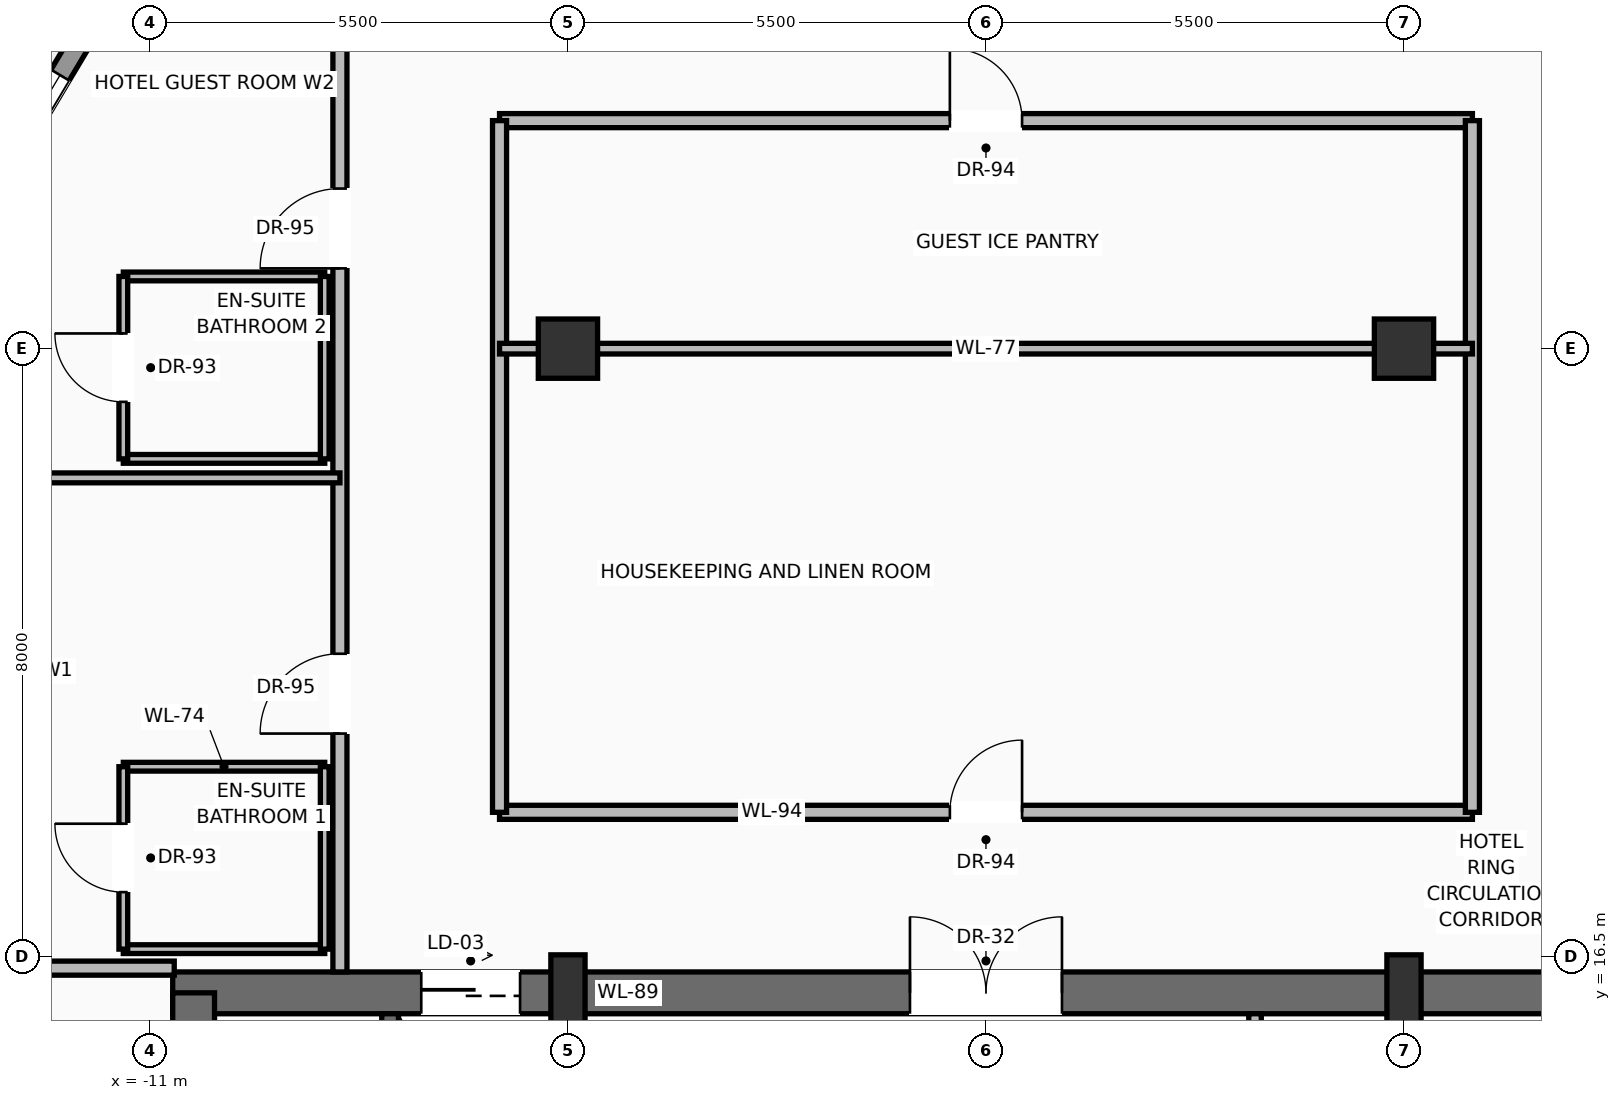
"""IFC4 building model, lengths in metres.
Left out: names, types, materials, properties, quantities, classifications, styles, units other than length and angle.
Written with IfcOpenShell. Run it as: python <this file> out.ifc"""

import sys

from ifc_helpers import new_model, si_unit, direction, frame, frame_2d, origin, origin_2d, place, context, subcontext, project, spatial, rectangle, extrude, source, transform, mapped, element, fill, save


model = new_model("IFC4")
c1 = context("Model", 3, precision=1e-05, world=origin(), true_north=direction((0.0, 1.0)))
c2 = subcontext(c1, "Body", "Model", "MODEL_VIEW")
j1 = project(units=[si_unit("LENGTHUNIT", "METRE"), si_unit("PLANEANGLEUNIT", "RADIAN")], contexts=[c1])
p1 = place(None, origin())
s1 = spatial("IfcSite", under=j1, at=p1, CompositionType="ELEMENT")
p2 = place(p1, origin())
s2 = spatial("IfcBuilding", under=s1, at=p2, CompositionType="ELEMENT")
p3 = place(p2, frame((0.0, 0.0, 223.45)))
s3 = spatial("IfcBuildingStorey", under=s2, at=p3, CompositionType="ELEMENT", Elevation=223.45)
p4 = place(p3, frame((-10.7, 16.025, 0.0), z_axis=(0.0, 0.0, 1.0), x_axis=(1.0, 0.0, 0.0)))
e1 = element("IfcWall", 1, at=p4, inside=s3, PredefinedType="SHEAR", context=c2, shape_type="SweptSolid", body=[
    extrude(rectangle(XDim=21.4, YDim=0.55, at=frame_2d((10.7, 0.0))), origin(), (0.0, 0.0, 1.0), 3.24),
])
p5 = place(p4, frame((3.27, 0.0, 0.0)))
e2 = element("IfcOpeningElement", 2, at=p5, cuts=e1, PredefinedType="OPENING", context=c2, shape_type="SweptSolid", body=[
    extrude(rectangle(XDim=1.3, YDim=2.3, at=frame_2d((0.65, 1.15))), frame((0.0, 0.285, 0.0), z_axis=(0.0, -1.0, 0.0), x_axis=(1.0, 0.0, 0.0)), (0.0, 0.0, 1.0), 0.57),
])
p6 = place(p4, frame((9.7, 0.0, 0.0)))
e3 = element("IfcOpeningElement", 3, at=p6, cuts=e1, PredefinedType="OPENING", context=c2, shape_type="SweptSolid", body=[
    extrude(rectangle(XDim=2.0, YDim=2.4, at=frame_2d((1.0, 1.2))), frame((0.0, 0.285, 0.0), z_axis=(0.0, -1.0, 0.0), x_axis=(1.0, 0.0, 0.0)), (0.0, 0.0, 1.0), 0.57),
])
p7 = place(p3, frame((-10.425, 0.575, 0.0), z_axis=(0.0, 0.0, 1.0), x_axis=(0.0, 1.0, 0.0)))
e4 = element("IfcWall", 4, at=p7, inside=s3, PredefinedType="SHEAR", context=c2, shape_type="SweptSolid", body=[
    extrude(rectangle(XDim=15.45, YDim=0.55, at=frame_2d((7.725, 0.0))), origin(), (0.0, 0.0, 1.0), 3.24),
])
p8 = place(p3, frame((-5.5, 0.575, 0.0), z_axis=(0.0, 0.0, 1.0), x_axis=(0.0, 1.0, 0.0)))
e5 = element("IfcWall", 5, at=p8, inside=s3, PredefinedType="SHEAR", context=c2, shape_type="SweptSolid", body=[
    extrude(rectangle(XDim=15.45, YDim=0.4, at=frame_2d((7.725, 0.0))), origin(), (0.0, 0.0, 1.0), 3.24),
])
p9 = place(p8, frame((8.925, 0.0, 0.0)))
e6 = element("IfcOpeningElement", 6, at=p9, cuts=e5, PredefinedType="OPENING", context=c2, shape_type="SweptSolid", body=[
    extrude(rectangle(XDim=1.1, YDim=2.2, at=frame_2d((0.55, 1.1))), frame((0.0, 0.21, 0.0), z_axis=(0.0, -1.0, 0.0), x_axis=(1.0, 0.0, 0.0)), (0.0, 0.0, 1.0), 0.42),
])
p10 = place(p3, frame((5.5, 0.575, 0.0), z_axis=(0.0, 0.0, 1.0), x_axis=(0.0, 1.0, 0.0)))
e7 = element("IfcWall", 7, at=p10, inside=s3, PredefinedType="SHEAR", context=c2, shape_type="SweptSolid", body=[
    extrude(rectangle(XDim=15.45, YDim=0.4, at=frame_2d((7.725, 0.0))), origin(), (0.0, 0.0, 1.0), 3.24),
])
p11 = place(p10, frame((8.925, 0.0, 0.0)))
e8 = element("IfcOpeningElement", 8, at=p11, cuts=e7, PredefinedType="OPENING", context=c2, shape_type="SweptSolid", body=[
    extrude(rectangle(XDim=1.1, YDim=2.2, at=frame_2d((0.55, 1.1))), frame((0.0, 0.21, 0.0), z_axis=(0.0, -1.0, 0.0), x_axis=(1.0, 0.0, 0.0)), (0.0, 0.0, 1.0), 0.42),
])
m1 = source(origin(), c2, "Body", "SweptSolid", [
    extrude(rectangle(XDim=0.45, YDim=0.95, at=origin_2d()), origin(), (0.0, 0.0, 1.0), 3.45),
])
for number, where, z_axis, x_axis in (
    (9, (-5.5, 16.05, 0.0), (0.0, 0.0, 1.0), (1.0, 0.0, 0.0)),
    (10, (5.5, 16.05, 0.0), (0.0, 0.0, 1.0), (1.0, 0.0, 0.0)),
):
    element("IfcColumn", number, at=place(p3, frame(where, z_axis=z_axis, x_axis=x_axis)), inside=s3, PredefinedType="PILASTER", context=c2, shape_type="MappedRepresentation", body=[
        mapped(m1, transform((0.0, 0.0, 0.0), scale=1.0)),
    ])
m2 = source(origin(), c2, "Body", "SweptSolid", [
    extrude(rectangle(XDim=0.78, YDim=0.78, at=origin_2d()), origin(), (0.0, 0.0, 1.0), 3.45),
])
for number, where, z_axis, x_axis in (
    (11, (-5.5, 24.5, 0.0), (0.0, 0.0, 1.0), (1.0, 0.0, 0.0)),
    (12, (5.5, 24.5, 0.0), (0.0, 0.0, 1.0), (1.0, 0.0, 0.0)),
):
    element("IfcColumn", number, at=place(p3, frame(where, z_axis=z_axis, x_axis=x_axis)), inside=s3, PredefinedType="COLUMN", context=c2, shape_type="MappedRepresentation", body=[
        mapped(m2, transform((0.0, 0.0, 0.0), scale=1.0)),
    ])
p12 = place(p3, frame((-19.736, 15.464, 0.0), z_axis=(0.0, 0.0, 1.0), x_axis=(0.513136432844, 0.858307055364, 0.0)))
e13 = element("IfcWall", 13, at=p12, inside=s3, PredefinedType="SOLIDWALL", context=c2, shape_type="SweptSolid", body=[
    extrude(rectangle(XDim=19.37, YDim=0.28, at=frame_2d((9.685, 0.0))), origin(), (0.0, 0.0, 1.0), 2.82),
])
p13 = place(p12, frame((4.649, 0.0, 0.0)))
e14 = element("IfcOpeningElement", 14, at=p13, cuts=e13, PredefinedType="OPENING", context=c2, shape_type="SweptSolid", body=[
    extrude(rectangle(XDim=1.6, YDim=2.35, at=frame_2d((0.8, 1.175))), frame((0.0, 0.15, 0.0), z_axis=(0.0, -1.0, 0.0), x_axis=(1.0, 0.0, 0.0)), (0.0, 0.0, 1.0), 0.3),
])
p14 = place(p12, frame((13.171, 0.0, 0.9)))
e15 = element("IfcOpeningElement", 15, at=p14, cuts=e13, PredefinedType="OPENING", context=c2, shape_type="SweptSolid", body=[
    extrude(rectangle(XDim=1.55, YDim=1.75, at=frame_2d((0.775, 0.875))), frame((0.0, 0.15, 0.0), z_axis=(0.0, -1.0, 0.0), x_axis=(1.0, 0.0, 0.0)), (0.0, 0.0, 1.0), 0.3),
])
p15 = place(p3, frame((-7.84, 11.87, 0.0), z_axis=(0.0, 0.0, 1.0), x_axis=(0.0, 1.0, 0.0)))
e16 = element("IfcWall", 16, at=p15, inside=s3, PredefinedType="SOLIDWALL", context=c2, shape_type="SweptSolid", body=[
    extrude(rectangle(XDim=3.88, YDim=0.22, at=frame_2d((1.94, 0.0))), origin(), (0.0, 0.0, 1.0), 3.24),
])
p16 = place(p3, frame((3.54, 11.22, 0.0), z_axis=(0.0, 0.0, 1.0), x_axis=(0.0, 1.0, 0.0)))
e17 = element("IfcWall", 17, at=p16, inside=s3, PredefinedType="PARTITIONING", context=c2, shape_type="SweptSolid", body=[
    extrude(rectangle(XDim=4.53, YDim=0.165, at=frame_2d((2.265, 0.0))), origin(), (0.0, 0.0, 1.0), 3.232),
])
p17 = place(p16, frame((1.25, 0.0, 0.0)))
e18 = element("IfcOpeningElement", 18, at=p17, cuts=e17, PredefinedType="OPENING", context=c2, shape_type="SweptSolid", body=[
    extrude(rectangle(XDim=0.9, YDim=2.1, at=frame_2d((0.45, 1.05))), frame((0.0, 0.093, 0.0), z_axis=(0.0, -1.0, 0.0), x_axis=(1.0, 0.0, 0.0)), (0.0, 0.0, 1.0), 0.185),
])
p18 = place(p3, frame((-6.4, 18.4, 0.0), z_axis=(0.0, 0.0, 1.0), x_axis=(1.0, 0.0, 0.0)))
e19 = element("IfcWall", 19, at=p18, inside=s3, PredefinedType="PARTITIONING", context=c2, shape_type="SweptSolid", body=[
    extrude(rectangle(XDim=12.8, YDim=0.185, at=frame_2d((6.4, 0.0))), origin(), (0.0, 0.0, 1.0), 3.232),
])
p19 = place(p18, frame((5.925, 0.0, 0.0)))
e20 = element("IfcOpeningElement", 20, at=p19, cuts=e19, PredefinedType="OPENING", context=c2, shape_type="SweptSolid", body=[
    extrude(rectangle(XDim=0.95, YDim=2.2, at=frame_2d((0.475, 1.1))), frame((0.0, 0.103, 0.0), z_axis=(0.0, -1.0, 0.0), x_axis=(1.0, 0.0, 0.0)), (0.0, 0.0, 1.0), 0.205),
])
p20 = place(p3, frame((-6.4, 27.5, 0.0), z_axis=(0.0, 0.0, 1.0), x_axis=(1.0, 0.0, 0.0)))
e21 = element("IfcWall", 21, at=p20, inside=s3, PredefinedType="PARTITIONING", context=c2, shape_type="SweptSolid", body=[
    extrude(rectangle(XDim=12.8, YDim=0.185, at=frame_2d((6.4, 0.0))), origin(), (0.0, 0.0, 1.0), 3.232),
])
p21 = place(p20, frame((5.925, 0.0, 0.0)))
e22 = element("IfcOpeningElement", 22, at=p21, cuts=e21, PredefinedType="OPENING", context=c2, shape_type="SweptSolid", body=[
    extrude(rectangle(XDim=0.95, YDim=2.2, at=frame_2d((0.475, 1.1))), frame((0.0, 0.103, 0.0), z_axis=(0.0, -1.0, 0.0), x_axis=(1.0, 0.0, 0.0)), (0.0, 0.0, 1.0), 0.205),
])
for number, where, z_axis, x_axis in (
    (23, (-6.4, 18.4, 0.0), (0.0, 0.0, 1.0), (0.0, 1.0, 0.0)),
    (24, (6.4, 18.4, 0.0), (0.0, 0.0, 1.0), (0.0, 1.0, 0.0)),
):
    element("IfcWall", number, at=place(p3, frame(where, z_axis=z_axis, x_axis=x_axis)), inside=s3, PredefinedType="PARTITIONING", context=c2, shape_type="SweptSolid", body=[
        extrude(rectangle(XDim=9.1, YDim=0.185, at=frame_2d((4.55, 0.0))), origin(), (0.0, 0.0, 1.0), 3.232),
    ])
p22 = place(p3, frame((-8.5, 16.3, 0.0), z_axis=(0.0, 0.0, 1.0), x_axis=(0.0, 1.0, 0.0)))
e25 = element("IfcWall", 25, at=p22, inside=s3, PredefinedType="PARTITIONING", context=c2, shape_type="SweptSolid", body=[
    extrude(rectangle(XDim=13.3, YDim=0.185, at=frame_2d((6.65, 0.0))), origin(), (0.0, 0.0, 1.0), 3.232),
])
p23 = place(p22, frame((3.136, 0.0, 0.0)))
e26 = element("IfcOpeningElement", 26, at=p23, cuts=e25, PredefinedType="OPENING", context=c2, shape_type="SweptSolid", body=[
    extrude(rectangle(XDim=1.05, YDim=2.25, at=frame_2d((0.525, 1.125))), frame((0.0, 0.103, 0.0), z_axis=(0.0, -1.0, 0.0), x_axis=(1.0, 0.0, 0.0)), (0.0, 0.0, 1.0), 0.205),
])
p24 = place(p22, frame((9.256, 0.0, 0.0)))
e27 = element("IfcOpeningElement", 27, at=p24, cuts=e25, PredefinedType="OPENING", context=c2, shape_type="SweptSolid", body=[
    extrude(rectangle(XDim=1.05, YDim=2.25, at=frame_2d((0.525, 1.125))), frame((0.0, 0.103, 0.0), z_axis=(0.0, -1.0, 0.0), x_axis=(1.0, 0.0, 0.0)), (0.0, 0.0, 1.0), 0.205),
])
p25 = place(p3, frame((-6.4, 24.5, 0.0), z_axis=(0.0, 0.0, 1.0), x_axis=(1.0, 0.0, 0.0)))
e28 = element("IfcWall", 28, at=p25, inside=s3, PredefinedType="PARTITIONING", context=c2, shape_type="SweptSolid", body=[
    extrude(rectangle(XDim=12.8, YDim=0.14, at=frame_2d((6.4, 0.0))), origin(), (0.0, 0.0, 1.0), 2.683),
])
p26 = place(p3, frame((-19.358, 16.35, 0.0), z_axis=(0.0, 0.0, 1.0), x_axis=(1.0, 0.0, 0.0)))
e29 = element("IfcWall", 29, at=p26, inside=s3, PredefinedType="PARTITIONING", context=c2, shape_type="SweptSolid", body=[
    extrude(rectangle(XDim=8.678, YDim=0.185, at=frame_2d((4.339, 0.0))), origin(), (0.0, 0.0, 1.0), 3.232),
])
p27 = place(p26, frame((5.013, 0.0, 0.0)))
e30 = element("IfcOpeningElement", 30, at=p27, cuts=e29, PredefinedType="OPENING", context=c2, shape_type="SweptSolid", body=[
    extrude(rectangle(XDim=1.05, YDim=2.25, at=frame_2d((0.525, 1.125))), frame((0.0, 0.103, 0.0), z_axis=(0.0, -1.0, 0.0), x_axis=(1.0, 0.0, 0.0)), (0.0, 0.0, 1.0), 0.205),
])
for number, where, z_axis, x_axis in (
    (31, (-11.35, 16.6, 0.0), (0.0, 0.0, 1.0), (1.0, 0.0, 0.0)),
    (32, (-11.35, 19.0, 0.0), (0.0, 0.0, 1.0), (1.0, 0.0, 0.0)),
):
    element("IfcWall", number, at=place(p3, frame(where, z_axis=z_axis, x_axis=x_axis)), inside=s3, PredefinedType="PARTITIONING", context=c2, shape_type="SweptSolid", body=[
        extrude(rectangle(XDim=2.65, YDim=0.115, at=frame_2d((1.325, 0.0))), origin(), (0.0, 0.0, 1.0), 3.232),
    ])
p28 = place(p3, frame((-11.35, 16.6, 0.0), z_axis=(0.0, 0.0, 1.0), x_axis=(0.0, 1.0, 0.0)))
e33 = element("IfcWall", 33, at=p28, inside=s3, PredefinedType="PARTITIONING", context=c2, shape_type="SweptSolid", body=[
    extrude(rectangle(XDim=2.4, YDim=0.115, at=frame_2d((1.2, 0.0))), origin(), (0.0, 0.0, 1.0), 3.232),
])
p29 = place(p28, frame((0.75, 0.0, 0.0)))
e34 = element("IfcOpeningElement", 34, at=p29, cuts=e33, PredefinedType="OPENING", context=c2, shape_type="SweptSolid", body=[
    extrude(rectangle(XDim=0.9, YDim=2.15, at=frame_2d((0.45, 1.075))), frame((0.0, 0.067, 0.0), z_axis=(0.0, -1.0, 0.0), x_axis=(1.0, 0.0, 0.0)), (0.0, 0.0, 1.0), 0.135),
])
p30 = place(p3, frame((-8.7, 16.6, 0.0), z_axis=(0.0, 0.0, 1.0), x_axis=(0.0, 1.0, 0.0)))
e35 = element("IfcWall", 35, at=p30, inside=s3, PredefinedType="PARTITIONING", context=c2, shape_type="SweptSolid", body=[
    extrude(rectangle(XDim=2.4, YDim=0.115, at=frame_2d((1.2, 0.0))), origin(), (0.0, 0.0, 1.0), 3.232),
])
p31 = place(p3, frame((-15.501, 22.8, 0.0), z_axis=(0.0, 0.0, 1.0), x_axis=(1.0, 0.0, 0.0)))
e36 = element("IfcWall", 36, at=p31, inside=s3, PredefinedType="PARTITIONING", context=c2, shape_type="SweptSolid", body=[
    extrude(rectangle(XDim=7.001, YDim=0.13, at=frame_2d((3.501, 0.0))), origin(), (0.0, 0.0, 1.0), 3.232),
])
for number, where, z_axis, x_axis in (
    (37, (-11.35, 23.05, 0.0), (0.0, 0.0, 1.0), (1.0, 0.0, 0.0)),
    (38, (-11.35, 25.45, 0.0), (0.0, 0.0, 1.0), (1.0, 0.0, 0.0)),
):
    element("IfcWall", number, at=place(p3, frame(where, z_axis=z_axis, x_axis=x_axis)), inside=s3, PredefinedType="PARTITIONING", context=c2, shape_type="SweptSolid", body=[
        extrude(rectangle(XDim=2.65, YDim=0.115, at=frame_2d((1.325, 0.0))), origin(), (0.0, 0.0, 1.0), 3.232),
    ])
p32 = place(p3, frame((-11.35, 23.05, 0.0), z_axis=(0.0, 0.0, 1.0), x_axis=(0.0, 1.0, 0.0)))
e39 = element("IfcWall", 39, at=p32, inside=s3, PredefinedType="PARTITIONING", context=c2, shape_type="SweptSolid", body=[
    extrude(rectangle(XDim=2.4, YDim=0.115, at=frame_2d((1.2, 0.0))), origin(), (0.0, 0.0, 1.0), 3.232),
])
p33 = place(p32, frame((0.75, 0.0, 0.0)))
e40 = element("IfcOpeningElement", 40, at=p33, cuts=e39, PredefinedType="OPENING", context=c2, shape_type="SweptSolid", body=[
    extrude(rectangle(XDim=0.9, YDim=2.15, at=frame_2d((0.45, 1.075))), frame((0.0, 0.067, 0.0), z_axis=(0.0, -1.0, 0.0), x_axis=(1.0, 0.0, 0.0)), (0.0, 0.0, 1.0), 0.135),
])
p34 = place(p3, frame((-8.7, 23.05, 0.0), z_axis=(0.0, 0.0, 1.0), x_axis=(0.0, 1.0, 0.0)))
e41 = element("IfcWall", 41, at=p34, inside=s3, PredefinedType="PARTITIONING", context=c2, shape_type="SweptSolid", body=[
    extrude(rectangle(XDim=2.4, YDim=0.115, at=frame_2d((1.2, 0.0))), origin(), (0.0, 0.0, 1.0), 3.232),
])
m3 = source(origin(), c2, "Body", "SweptSolid", [
    extrude(rectangle(XDim=1.55, YDim=1.75, at=frame_2d((0.775, 0.875))), frame((0.0, 0.03, 0.0), z_axis=(0.0, -1.0, 0.0), x_axis=(1.0, 0.0, 0.0)), (0.0, 0.0, 1.0), 0.06),
])
p35 = place(p14, origin())
e42 = element("IfcWindow", 42, at=p35, inside=s3, PartitioningType="SINGLE_PANEL", PredefinedType="WINDOW", context=c2, shape_type="MappedRepresentation", body=[
    mapped(m3, transform((0.0, 0.0, 0.0), scale=1.0)),
])
fill(e15, e42)
m4 = source(origin(), c2, "Body", "SweptSolid", [
    extrude(rectangle(XDim=1.3, YDim=2.3, at=frame_2d((0.65, 1.15))), frame((0.0, 0.025, 0.0), z_axis=(0.0, -1.0, 0.0), x_axis=(1.0, 0.0, 0.0)), (0.0, 0.0, 1.0), 0.05),
])
p36 = place(p5, origin())
e43 = element("IfcDoor", 43, at=p36, inside=s3, OperationType="SLIDING_TO_RIGHT", PredefinedType="DOOR", context=c2, shape_type="MappedRepresentation", body=[
    mapped(m4, transform((0.0, 0.0, 0.0), scale=1.0)),
])
fill(e2, e43)
m5 = source(origin(), c2, "Body", "SweptSolid", [
    extrude(rectangle(XDim=2.0, YDim=2.4, at=frame_2d((1.0, 1.2))), frame((0.0, 0.025, 0.0), z_axis=(0.0, -1.0, 0.0), x_axis=(1.0, 0.0, 0.0)), (0.0, 0.0, 1.0), 0.05),
])
p37 = place(p6, origin())
e44 = element("IfcDoor", 44, at=p37, inside=s3, OperationType="DOUBLE_DOOR_SINGLE_SWING", PredefinedType="DOOR", context=c2, shape_type="MappedRepresentation", body=[
    mapped(m5, transform((0.0, 0.0, 0.0), scale=1.0)),
])
fill(e3, e44)
m6 = source(origin(), c2, "Body", "SweptSolid", [
    extrude(rectangle(XDim=0.95, YDim=2.2, at=frame_2d((0.475, 1.1))), frame((0.0, 0.025, 0.0), z_axis=(0.0, -1.0, 0.0), x_axis=(1.0, 0.0, 0.0)), (0.0, 0.0, 1.0), 0.05),
])
p38 = place(p19, origin())
e45 = element("IfcDoor", 45, at=p38, inside=s3, OperationType="SINGLE_SWING_RIGHT", PredefinedType="DOOR", context=c2, shape_type="MappedRepresentation", body=[
    mapped(m6, transform((0.0, 0.0, 0.0), scale=1.0)),
])
fill(e20, e45)
p39 = place(p21, origin())
e46 = element("IfcDoor", 46, at=p39, inside=s3, OperationType="SINGLE_SWING_LEFT", PredefinedType="DOOR", context=c2, shape_type="MappedRepresentation", body=[
    mapped(m6, transform((0.0, 0.0, 0.0), scale=1.0)),
])
fill(e22, e46)
m7 = source(origin(), c2, "Body", "SweptSolid", [
    extrude(rectangle(XDim=1.05, YDim=2.25, at=frame_2d((0.525, 1.125))), frame((0.0, 0.025, 0.0), z_axis=(0.0, -1.0, 0.0), x_axis=(1.0, 0.0, 0.0)), (0.0, 0.0, 1.0), 0.05),
])
p40 = place(p23, origin())
e47 = element("IfcDoor", 47, at=p40, inside=s3, OperationType="SINGLE_SWING_LEFT", PredefinedType="DOOR", context=c2, shape_type="MappedRepresentation", body=[
    mapped(m7, transform((0.0, 0.0, 0.0), scale=1.0)),
])
fill(e26, e47)
m8 = source(origin(), c2, "Body", "SweptSolid", [
    extrude(rectangle(XDim=0.9, YDim=2.15, at=frame_2d((0.45, 1.075))), frame((0.0, 0.025, 0.0), z_axis=(0.0, -1.0, 0.0), x_axis=(1.0, 0.0, 0.0)), (0.0, 0.0, 1.0), 0.05),
])
p41 = place(p29, origin())
e48 = element("IfcDoor", 48, at=p41, inside=s3, OperationType="SINGLE_SWING_RIGHT", PredefinedType="DOOR", context=c2, shape_type="MappedRepresentation", body=[
    mapped(m8, transform((0.0, 0.0, 0.0), scale=1.0)),
])
fill(e34, e48)
p42 = place(p24, origin())
e49 = element("IfcDoor", 49, at=p42, inside=s3, OperationType="SINGLE_SWING_LEFT", PredefinedType="DOOR", context=c2, shape_type="MappedRepresentation", body=[
    mapped(m7, transform((0.0, 0.0, 0.0), scale=1.0)),
])
fill(e27, e49)
p43 = place(p33, origin())
e50 = element("IfcDoor", 50, at=p43, inside=s3, OperationType="SINGLE_SWING_RIGHT", PredefinedType="DOOR", context=c2, shape_type="MappedRepresentation", body=[
    mapped(m8, transform((0.0, 0.0, 0.0), scale=1.0)),
])
fill(e40, e50)
save(model, sys.argv[1])
